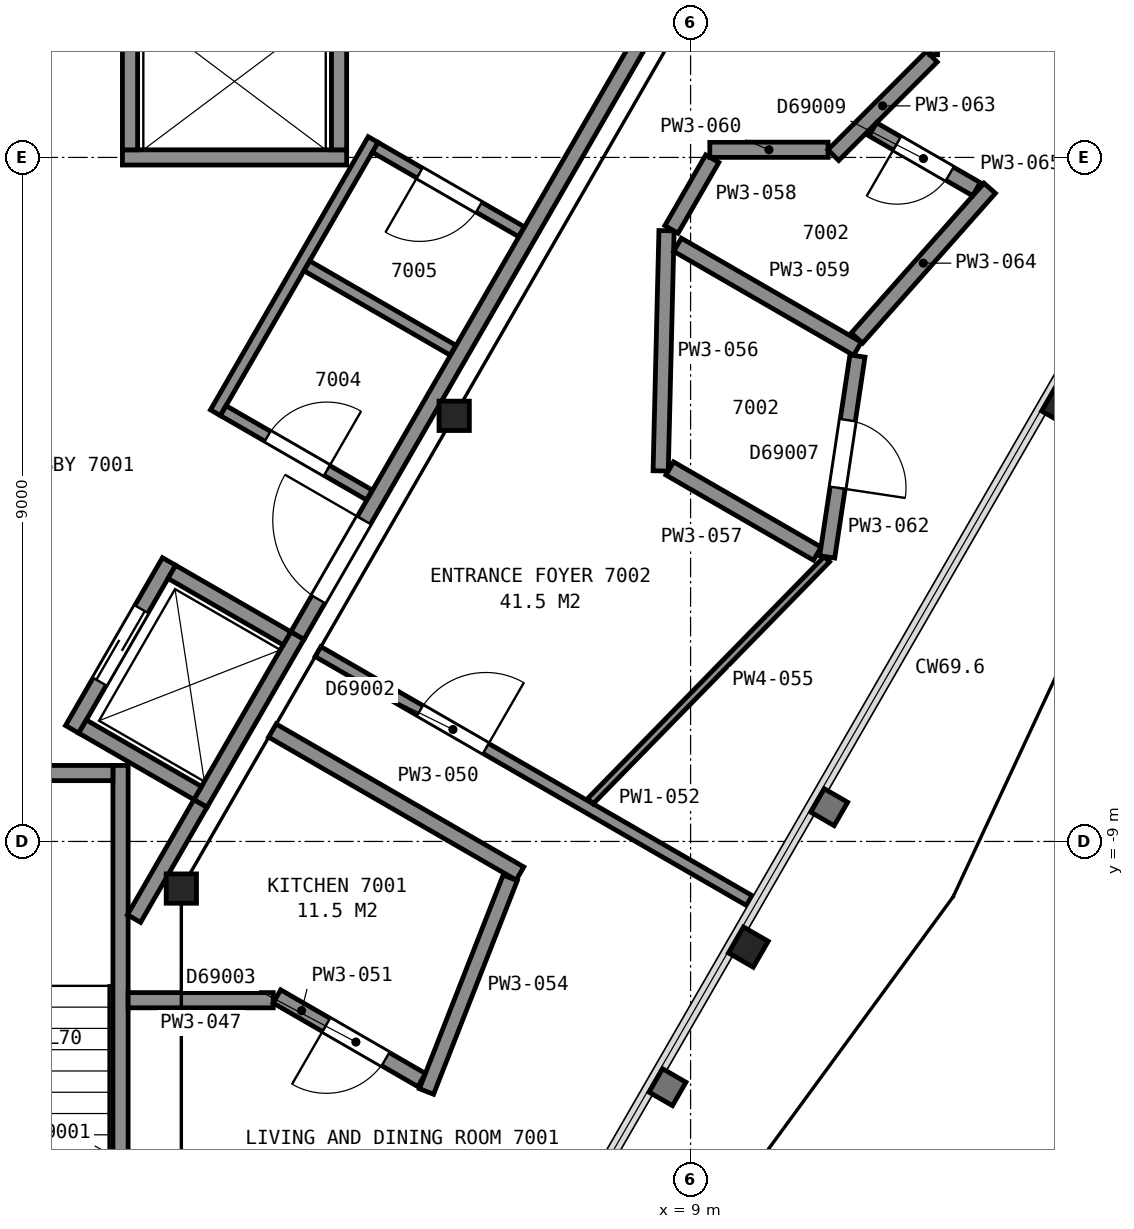
"""IFC4 building model, lengths in metres.
Left out: names, types, materials, properties, quantities, classifications, styles, units other than length and angle.
Written with IfcOpenShell. Run it as: python <this file> out.ifc"""

import sys

from ifc_helpers import new_model, si_unit, direction, frame, frame_2d, origin, origin_2d, place, context, subcontext, project, spatial, rectangle, i_section, extrude, element, fill, save


model = new_model("IFC4")
c1 = context("Model", 3, precision=1e-05, world=origin(), true_north=direction((0.0, 1.0)))
c2 = subcontext(c1, "Body", "Model", "MODEL_VIEW")
j1 = project(units=[si_unit("LENGTHUNIT", "METRE"), si_unit("PLANEANGLEUNIT", "RADIAN")], contexts=[c1])
p1 = place(None, origin())
s1 = spatial("IfcSite", under=j1, at=p1, CompositionType="ELEMENT")
p2 = place(p1, origin())
s2 = spatial("IfcBuilding", under=s1, at=p2, CompositionType="ELEMENT")
p3 = place(p2, frame((0.0, 0.0, 278.8)))
s3 = spatial("IfcBuildingStorey", under=s2, at=p3, CompositionType="ELEMENT", Elevation=278.8)
for number, where, z_axis, x_axis in (
    (1, (9.76, -10.39, 0.0), (0.0, 0.0, 1.0), (-0.5, -0.866, 0.0)),
    (2, (13.88, -3.26, 0.0), (0.0, 0.0, 1.0), (-0.5, -0.866, 0.0)),
):
    element("IfcColumn", number, at=place(p3, frame(where, z_axis=z_axis, x_axis=x_axis)), inside=s3, PredefinedType="COLUMN", context=c2, shape_type="SweptSolid", body=[
        extrude(i_section(OverallWidth=0.394, OverallDepth=0.376, WebThickness=0.017, FlangeThickness=0.028, FilletRadius=0.015, at=origin_2d()), origin(), (0.0, 0.0, 1.0), 3.7),
    ])
for number, where, z_axis, x_axis in (
    (3, (2.3, -9.62, 0.0), (0.0, 0.0, 1.0), (1.0, 0.0, 0.0)),
    (4, (5.89, -3.4, 0.0), (0.0, 0.0, 1.0), (1.0, 0.0, 0.0)),
):
    element("IfcColumn", number, at=place(p3, frame(where, z_axis=z_axis, x_axis=x_axis)), inside=s3, PredefinedType="COLUMN", context=c2, shape_type="SweptSolid", body=[
        extrude(i_section(OverallWidth=0.399, OverallDepth=0.386, WebThickness=0.021, FlangeThickness=0.033, FilletRadius=0.015, at=origin_2d()), origin(), (0.0, 0.0, 1.0), 3.7),
    ])
p4 = place(p3, frame((1.5, -8.0, 0.0), z_axis=(0.0, 0.0, 1.0), x_axis=(0.0, -1.0, 0.0)))
e5 = element("IfcWall", 5, at=p4, inside=s3, PredefinedType="PARTITIONING", context=c2, shape_type="SweptSolid", body=[
    extrude(rectangle(XDim=7.2, YDim=0.2, at=frame_2d((3.6, 0.0))), origin(), (0.0, 0.0, 1.0), 3.45),
])
p5 = place(p3, frame((-1.4, -8.1, 0.0), z_axis=(0.0, 0.0, 1.0), x_axis=(1.0, 0.0, 0.0)))
e6 = element("IfcWall", 6, at=p5, inside=s3, PredefinedType="PARTITIONING", context=c2, shape_type="SweptSolid", body=[
    extrude(rectangle(XDim=2.8, YDim=0.2, at=frame_2d((1.4, 0.0))), origin(), (0.0, 0.0, 1.0), 3.45),
])
p6 = place(p3, frame((1.525, 0.0, 0.0), z_axis=(0.0, 0.0, 1.0), x_axis=(1.0, 0.0, 0.0)))
e7 = element("IfcWall", 7, at=p6, inside=s3, PredefinedType="PARTITIONING", context=c2, shape_type="SweptSolid", body=[
    extrude(rectangle(XDim=2.95, YDim=0.2, at=frame_2d((1.475, 0.0))), origin(), (0.0, 0.0, 1.0), 3.7),
])
p7 = place(p3, frame((2.552, -8.5, 0.0), z_axis=(0.0, 0.0, 1.0), x_axis=(0.499990435942, 0.866030925526, 0.0)))
e8 = element("IfcWall", 8, at=p7, inside=s3, PredefinedType="PARTITIONING", context=c2, shape_type="SweptSolid", body=[
    extrude(rectangle(XDim=2.55, YDim=0.2, at=frame_2d((1.275, 0.0))), origin(), (0.0, 0.0, 1.0), 3.7),
])
p8 = place(p3, frame((0.863, -7.525, 0.0), z_axis=(0.0, 0.0, 1.0), x_axis=(0.499990435942, 0.866030925526, 0.0)))
e9 = element("IfcWall", 9, at=p8, inside=s3, PredefinedType="PARTITIONING", context=c2, shape_type="SweptSolid", body=[
    extrude(rectangle(XDim=2.55, YDim=0.2, at=frame_2d((1.275, 0.0))), origin(), (0.0, 0.0, 1.0), 3.7),
])
p9 = place(p8, frame((0.725, 0.0, 0.0)))
e10 = element("IfcOpeningElement", 10, at=p9, cuts=e9, PredefinedType="OPENING", context=c2, shape_type="SweptSolid", body=[
    extrude(rectangle(XDim=1.1, YDim=2.1, at=frame_2d((0.55, 1.05))), frame((0.0, 0.11, 0.0), z_axis=(0.0, -1.0, 0.0), x_axis=(1.0, 0.0, 0.0)), (0.0, 0.0, 1.0), 0.22),
])
for number, where, z_axis, x_axis in (
    (11, (4.375, 0.1, 0.0), (0.0, 0.0, 1.0), (0.0, 1.0, 0.0)),
    (12, (1.625, 0.1, 0.0), (0.0, 0.0, 1.0), (0.0, 1.0, 0.0)),
):
    element("IfcWall", number, at=place(p3, frame(where, z_axis=z_axis, x_axis=x_axis)), inside=s3, PredefinedType="PARTITIONING", context=c2, shape_type="SweptSolid", body=[
        extrude(rectangle(XDim=1.95, YDim=0.2, at=frame_2d((0.975, 0.0))), origin(), (0.0, 0.0, 1.0), 3.7),
    ])
for number, where, z_axis, x_axis in (
    (13, (3.69, -6.328, 0.0), (0.0, 0.0, 1.0), (-0.866, 0.5, 0.0)),
    (14, (2.515, -8.363, 0.0), (0.0, 0.0, 1.0), (-0.866, 0.5, 0.0)),
):
    element("IfcWall", number, at=place(p3, frame(where, z_axis=z_axis, x_axis=x_axis)), inside=s3, PredefinedType="PARTITIONING", context=c2, shape_type="SweptSolid", body=[
        extrude(rectangle(XDim=1.75, YDim=0.2, at=frame_2d((0.875, 0.0))), origin(), (0.0, 0.0, 1.0), 3.7),
    ])
p10 = place(p3, frame((1.677, -10.015, 0.0), z_axis=(0.0, 0.0, 1.0), x_axis=(0.49983532306, 0.866120459187, 0.0)))
e15 = element("IfcWall", 15, at=p10, inside=s3, PredefinedType="PARTITIONING", context=c2, shape_type="SweptSolid", body=[
    extrude(rectangle(XDim=1.748, YDim=0.2, at=frame_2d((0.874, 0.0))), origin(), (0.0, 0.0, 1.0), 3.45),
])
p11 = place(p3, frame((2.749, -3.359, 0.0), z_axis=(0.0, 0.0, 1.0), x_axis=(0.500017827812, 0.866015110648, 0.0)))
e16 = element("IfcWall", 16, at=p11, inside=s3, PredefinedType="PARTITIONING", context=c2, shape_type="SweptSolid", body=[
    extrude(rectangle(XDim=4.15, YDim=0.15, at=frame_2d((2.075, 0.0))), origin(), (0.0, 0.0, 1.0), 3.45),
])
p12 = place(p3, frame((2.851, -3.332, 0.0), z_axis=(0.0, 0.0, 1.0), x_axis=(0.866110524189, -0.499852538144, 0.0)))
e17 = element("IfcWall", 17, at=p12, inside=s3, PredefinedType="PARTITIONING", context=c2, shape_type="SweptSolid", body=[
    extrude(rectangle(XDim=2.22, YDim=0.15, at=frame_2d((1.11, 0.0))), origin(), (0.0, 0.0, 1.0), 3.45),
])
p13 = place(p12, frame((0.675, 0.0, 0.0)))
e18 = element("IfcOpeningElement", 18, at=p13, cuts=e17, PredefinedType="OPENING", context=c2, shape_type="SweptSolid", body=[
    extrude(rectangle(XDim=0.9, YDim=2.1, at=frame_2d((0.45, 1.05))), frame((0.0, 0.085, 0.0), z_axis=(0.0, -1.0, 0.0), x_axis=(1.0, 0.0, 0.0)), (0.0, 0.0, 1.0), 0.17),
])
p14 = place(p3, frame((3.828, -6.29, 0.0), z_axis=(0.0, 0.0, 1.0), x_axis=(0.499979739078, 0.866037101117, 0.0)))
e19 = element("IfcWall", 19, at=p14, inside=s3, PredefinedType="PARTITIONING", context=c2, shape_type="SweptSolid", body=[
    extrude(rectangle(XDim=11.363, YDim=0.2, at=frame_2d((5.681, 0.0))), origin(), (0.0, 0.0, 1.0), 3.45),
])
p15 = place(p14, frame((0.55, 0.0, 0.0)))
e20 = element("IfcOpeningElement", 20, at=p15, cuts=e19, PredefinedType="OPENING", context=c2, shape_type="SweptSolid", body=[
    extrude(rectangle(XDim=1.2, YDim=2.1, at=frame_2d((0.6, 1.05))), frame((0.0, 0.11, 0.0), z_axis=(0.0, -1.0, 0.0), x_axis=(1.0, 0.0, 0.0)), (0.0, 0.0, 1.0), 0.22),
])
p16 = place(p3, frame((3.951, -1.427, 0.0), z_axis=(0.0, 0.0, 1.0), x_axis=(0.866062920605, -0.499935013329, 0.0)))
e21 = element("IfcWall", 21, at=p16, inside=s3, PredefinedType="PARTITIONING", context=c2, shape_type="SweptSolid", body=[
    extrude(rectangle(XDim=2.22, YDim=0.15, at=frame_2d((1.11, 0.0))), origin(), (0.0, 0.0, 1.0), 3.45),
])
p17 = place(p3, frame((6.774, -0.978, 0.0), z_axis=(0.0, 0.0, 1.0), x_axis=(-0.866062920605, 0.499935013329, 0.0)))
e22 = element("IfcWall", 22, at=p17, inside=s3, PredefinedType="PARTITIONING", context=c2, shape_type="SweptSolid", body=[
    extrude(rectangle(XDim=2.22, YDim=0.15, at=frame_2d((1.11, 0.0))), origin(), (0.0, 0.0, 1.0), 3.45),
])
p18 = place(p17, frame((0.646, 0.0, 0.0)))
e23 = element("IfcOpeningElement", 23, at=p18, cuts=e22, PredefinedType="OPENING", context=c2, shape_type="SweptSolid", body=[
    extrude(rectangle(XDim=0.9, YDim=2.1, at=frame_2d((0.45, 1.05))), frame((0.0, 0.085, 0.0), z_axis=(0.0, -1.0, 0.0), x_axis=(1.0, 0.0, 0.0)), (0.0, 0.0, 1.0), 0.17),
])
p19 = place(p3, frame((1.6, -11.089, 0.0), z_axis=(0.0, 0.0, 1.0), x_axis=(1.0, 0.0, 0.0)))
e24 = element("IfcWall", 24, at=p19, inside=s3, PredefinedType="PARTITIONING", context=c2, shape_type="SweptSolid", body=[
    extrude(rectangle(XDim=1.909, YDim=0.2, at=frame_2d((0.955, 0.0))), origin(), (0.0, 0.0, 1.0), 2.723),
])
p20 = place(p3, frame((3.498, -7.541, 0.0), z_axis=(0.0, 0.0, 1.0), x_axis=(0.865985624761, -0.500068892961, 0.0)))
e25 = element("IfcWall", 25, at=p20, inside=s3, PredefinedType="PARTITIONING", context=c2, shape_type="SweptSolid", body=[
    extrude(rectangle(XDim=3.762, YDim=0.2, at=frame_2d((1.881, 0.0))), origin(), (0.0, 0.0, 1.0), 2.723),
])
p21 = place(p3, frame((3.557, -11.039, 0.0), z_axis=(0.0, 0.0, 1.0), x_axis=(0.865932364885, -0.500161113487, 0.0)))
e26 = element("IfcWall", 26, at=p21, inside=s3, PredefinedType="PARTITIONING", context=c2, shape_type="SweptSolid", body=[
    extrude(rectangle(XDim=2.2, YDim=0.2, at=frame_2d((1.1, 0.0))), origin(), (0.0, 0.0, 1.0), 2.723),
])
p22 = place(p21, frame((0.75, 0.0, 0.0)))
e27 = element("IfcOpeningElement", 27, at=p22, cuts=e26, PredefinedType="OPENING", context=c2, shape_type="SweptSolid", body=[
    extrude(rectangle(XDim=0.9, YDim=2.1, at=frame_2d((0.45, 1.05))), frame((0.0, 0.11, 0.0), z_axis=(0.0, -1.0, 0.0), x_axis=(1.0, 0.0, 0.0)), (0.0, 0.0, 1.0), 0.22),
])
p23 = place(p3, frame((9.772, -9.777, 0.0), z_axis=(0.0, 0.0, 1.0), x_axis=(-0.866083818164, 0.499898809675, 0.0)))
e28 = element("IfcWall", 28, at=p23, inside=s3, PredefinedType="PARTITIONING", context=c2, shape_type="SweptSolid", body=[
    extrude(rectangle(XDim=6.551, YDim=0.15, at=frame_2d((3.275, 0.0))), origin(), (0.0, 0.0, 1.0), 2.723),
])
p24 = place(p23, frame((4.001, 0.0, 0.0)))
e29 = element("IfcOpeningElement", 29, at=p24, cuts=e28, PredefinedType="OPENING", context=c2, shape_type="SweptSolid", body=[
    extrude(rectangle(XDim=1.0, YDim=2.1, at=frame_2d((0.5, 1.05))), frame((0.0, 0.085, 0.0), z_axis=(0.0, -1.0, 0.0), x_axis=(1.0, 0.0, 0.0)), (0.0, 0.0, 1.0), 0.17),
])
p25 = place(p3, frame((5.526, -12.29, 0.0), z_axis=(0.0, 0.0, 1.0), x_axis=(0.364786545928, 0.931091174864, 0.0)))
e30 = element("IfcWall", 30, at=p25, inside=s3, PredefinedType="PARTITIONING", context=c2, shape_type="SweptSolid", body=[
    extrude(rectangle(XDim=3.019, YDim=0.2, at=frame_2d((1.51, 0.0))), origin(), (0.0, 0.0, 1.0), 2.723),
])
p26 = place(p3, frame((7.682, -8.47, 0.0), z_axis=(0.0, 0.0, 1.0), x_axis=(0.698777378461, 0.715339203002, 0.0)))
e31 = element("IfcWall", 31, at=p26, inside=s3, PredefinedType="PARTITIONING", context=c2, shape_type="SweptSolid", body=[
    extrude(rectangle(XDim=4.452, YDim=0.1, at=frame_2d((2.226, 0.0))), origin(), (0.0, 0.0, 1.0), 2.723),
])
p27 = place(p3, frame((8.607, -4.125, 0.0), z_axis=(0.0, 0.0, 1.0), x_axis=(0.024245593124, 0.999706032399, 0.0)))
e32 = element("IfcWall", 32, at=p27, inside=s3, PredefinedType="PARTITIONING", context=c2, shape_type="SweptSolid", body=[
    extrude(rectangle(XDim=3.162, YDim=0.2, at=frame_2d((1.581, 0.0))), origin(), (0.0, 0.0, 1.0), 2.723),
])
p28 = place(p3, frame((8.726, -4.093, 0.0), z_axis=(0.0, 0.0, 1.0), x_axis=(0.866056839033, -0.499945548598, 0.0)))
e33 = element("IfcWall", 33, at=p28, inside=s3, PredefinedType="PARTITIONING", context=c2, shape_type="SweptSolid", body=[
    extrude(rectangle(XDim=2.242, YDim=0.2, at=frame_2d((1.121, 0.0))), origin(), (0.0, 0.0, 1.0), 2.723),
])
p29 = place(p3, frame((8.749, -0.947, 0.0), z_axis=(0.0, 0.0, 1.0), x_axis=(0.499656913366, 0.866223394354, 0.0)))
e34 = element("IfcWall", 34, at=p29, inside=s3, PredefinedType="PARTITIONING", context=c2, shape_type="SweptSolid", body=[
    extrude(rectangle(XDim=1.075, YDim=0.2, at=frame_2d((0.538, 0.0))), origin(), (0.0, 0.0, 1.0), 2.723),
])
p30 = place(p3, frame((8.828, -1.149, 0.0), z_axis=(0.0, 0.0, 1.0), x_axis=(0.865853899269, -0.50029693695, 0.0)))
e35 = element("IfcWall", 35, at=p30, inside=s3, PredefinedType="PARTITIONING", context=c2, shape_type="SweptSolid", body=[
    extrude(rectangle(XDim=2.734, YDim=0.2, at=frame_2d((1.367, 0.0))), origin(), (0.0, 0.0, 1.0), 2.723),
])
p31 = place(p3, frame((9.253, 0.101, 0.0), z_axis=(0.0, 0.0, 1.0), x_axis=(1.0, 0.0, 0.0)))
e36 = element("IfcWall", 36, at=p31, inside=s3, PredefinedType="PARTITIONING", context=c2, shape_type="SweptSolid", body=[
    extrude(rectangle(XDim=1.556, YDim=0.2, at=frame_2d((0.778, 0.0))), origin(), (0.0, 0.0, 1.0), 2.723),
])
p32 = place(p3, frame((10.797, -5.256, 0.0), z_axis=(0.0, 0.0, 1.0), x_axis=(0.148961207986, 0.988843040384, 0.0)))
e37 = element("IfcWall", 37, at=p32, inside=s3, PredefinedType="PARTITIONING", context=c2, shape_type="SweptSolid", body=[
    extrude(rectangle(XDim=2.673, YDim=0.2, at=frame_2d((1.336, 0.0))), origin(), (0.0, 0.0, 1.0), 2.723),
])
p33 = place(p32, frame((0.92, 0.0, 0.0)))
e38 = element("IfcOpeningElement", 38, at=p33, cuts=e37, PredefinedType="OPENING", context=c2, shape_type="SweptSolid", body=[
    extrude(rectangle(XDim=0.9, YDim=2.1, at=frame_2d((0.45, 1.05))), frame((0.0, 0.11, 0.0), z_axis=(0.0, -1.0, 0.0), x_axis=(1.0, 0.0, 0.0)), (0.0, 0.0, 1.0), 0.22),
])
p34 = place(p3, frame((10.878, 0.03, 0.0), z_axis=(0.0, 0.0, 1.0), x_axis=(0.707173379423, 0.707040176677, 0.0)))
e39 = element("IfcWall", 39, at=p34, inside=s3, PredefinedType="PARTITIONING", context=c2, shape_type="SweptSolid", body=[
    extrude(rectangle(XDim=1.833, YDim=0.2, at=frame_2d((0.917, 0.0))), origin(), (0.0, 0.0, 1.0), 2.723),
])
p35 = place(p3, frame((11.188, -2.377, 0.0), z_axis=(0.0, 0.0, 1.0), x_axis=(0.663045631266, 0.748578981043, 0.0)))
e40 = element("IfcWall", 40, at=p35, inside=s3, PredefinedType="PARTITIONING", context=c2, shape_type="SweptSolid", body=[
    extrude(rectangle(XDim=2.635, YDim=0.2, at=frame_2d((1.317, 0.0))), origin(), (0.0, 0.0, 1.0), 2.723),
])
p36 = place(p3, frame((12.761, -0.417, 0.0), z_axis=(0.0, 0.0, 1.0), x_axis=(-0.866030680601, 0.499990860175, 0.0)))
e41 = element("IfcWall", 41, at=p36, inside=s3, PredefinedType="PARTITIONING", context=c2, shape_type="SweptSolid", body=[
    extrude(rectangle(XDim=1.575, YDim=0.2, at=frame_2d((0.787, 0.0))), origin(), (0.0, 0.0, 1.0), 2.723),
])
p37 = place(p36, frame((0.405, 0.0, 0.0)))
e42 = element("IfcOpeningElement", 42, at=p37, cuts=e41, PredefinedType="OPENING", context=c2, shape_type="SweptSolid", body=[
    extrude(rectangle(XDim=0.8, YDim=2.1, at=frame_2d((0.4, 1.05))), frame((0.0, 0.11, 0.0), z_axis=(0.0, -1.0, 0.0), x_axis=(1.0, 0.0, 0.0)), (0.0, 0.0, 1.0), 0.22),
])
p38 = place(p3, frame((12.199, 3.682, 0.0), z_axis=(0.0, 0.0, 1.0), x_axis=(0.0, -1.0, 0.0)))
e43 = element("IfcWall", 43, at=p38, inside=s3, PredefinedType="PARTITIONING", context=c2, shape_type="SweptSolid", body=[
    extrude(rectangle(XDim=2.331, YDim=0.1, at=frame_2d((1.166, 0.0))), origin(), (0.0, 0.0, 1.0), 2.723),
])
p39 = place(p38, frame((0.631, 0.0, 0.0)))
e44 = element("IfcOpeningElement", 44, at=p39, cuts=e43, PredefinedType="OPENING", context=c2, shape_type="SweptSolid", body=[
    extrude(rectangle(XDim=1.0, YDim=2.1, at=frame_2d((0.5, 1.05))), frame((0.0, 0.06, 0.0), z_axis=(0.0, -1.0, 0.0), x_axis=(1.0, 0.0, 0.0)), (0.0, 0.0, 1.0), 0.12),
])
p40 = place(p9, origin())
e45 = element("IfcDoor", 45, at=p40, inside=s3, OperationType="SLIDING_TO_LEFT", PredefinedType="DOOR", context=c2, shape_type="SweptSolid", body=[
    extrude(rectangle(XDim=1.1, YDim=2.1, at=frame_2d((0.55, 1.05))), frame((0.0, 0.025, 0.0), z_axis=(0.0, -1.0, 0.0), x_axis=(1.0, 0.0, 0.0)), (0.0, 0.0, 1.0), 0.05),
])
fill(e10, e45)
p41 = place(p13, origin())
e46 = element("IfcDoor", 46, at=p41, inside=s3, OperationType="SINGLE_SWING_RIGHT", PredefinedType="DOOR", context=c2, shape_type="SweptSolid", body=[
    extrude(rectangle(XDim=0.9, YDim=2.1, at=frame_2d((0.45, 1.05))), frame((0.0, 0.025, 0.0), z_axis=(0.0, -1.0, 0.0), x_axis=(1.0, 0.0, 0.0)), (0.0, 0.0, 1.0), 0.05),
])
fill(e18, e46)
p42 = place(p15, origin())
e47 = element("IfcDoor", 47, at=p42, inside=s3, OperationType="SINGLE_SWING_RIGHT", PredefinedType="DOOR", context=c2, shape_type="SweptSolid", body=[
    extrude(rectangle(XDim=1.2, YDim=2.1, at=frame_2d((0.6, 1.05))), frame((0.0, 0.025, 0.0), z_axis=(0.0, -1.0, 0.0), x_axis=(1.0, 0.0, 0.0)), (0.0, 0.0, 1.0), 0.05),
])
fill(e20, e47)
p43 = place(p18, origin())
e48 = element("IfcDoor", 48, at=p43, inside=s3, OperationType="SINGLE_SWING_RIGHT", PredefinedType="DOOR", context=c2, shape_type="SweptSolid", body=[
    extrude(rectangle(XDim=0.9, YDim=2.1, at=frame_2d((0.45, 1.05))), frame((0.0, 0.025, 0.0), z_axis=(0.0, -1.0, 0.0), x_axis=(1.0, 0.0, 0.0)), (0.0, 0.0, 1.0), 0.05),
])
fill(e23, e48)
p44 = place(p22, origin())
e49 = element("IfcDoor", 49, at=p44, inside=s3, OperationType="SINGLE_SWING_LEFT", PredefinedType="DOOR", context=c2, shape_type="SweptSolid", body=[
    extrude(rectangle(XDim=0.9, YDim=2.1, at=frame_2d((0.45, 1.05))), frame((0.0, 0.025, 0.0), z_axis=(0.0, -1.0, 0.0), x_axis=(1.0, 0.0, 0.0)), (0.0, 0.0, 1.0), 0.05),
])
fill(e27, e49)
p45 = place(p24, origin())
e50 = element("IfcDoor", 50, at=p45, inside=s3, OperationType="SINGLE_SWING_LEFT", PredefinedType="DOOR", context=c2, shape_type="SweptSolid", body=[
    extrude(rectangle(XDim=1.0, YDim=2.1, at=frame_2d((0.5, 1.05))), frame((0.0, 0.025, 0.0), z_axis=(0.0, -1.0, 0.0), x_axis=(1.0, 0.0, 0.0)), (0.0, 0.0, 1.0), 0.05),
])
fill(e29, e50)
p46 = place(p33, origin())
e51 = element("IfcDoor", 51, at=p46, inside=s3, OperationType="SINGLE_SWING_LEFT", PredefinedType="DOOR", context=c2, shape_type="SweptSolid", body=[
    extrude(rectangle(XDim=0.9, YDim=2.1, at=frame_2d((0.45, 1.05))), frame((0.0, 0.025, 0.0), z_axis=(0.0, -1.0, 0.0), x_axis=(1.0, 0.0, 0.0)), (0.0, 0.0, 1.0), 0.05),
])
fill(e38, e51)
p47 = place(p37, origin())
e52 = element("IfcDoor", 52, at=p47, inside=s3, OperationType="SINGLE_SWING_RIGHT", PredefinedType="DOOR", context=c2, shape_type="SweptSolid", body=[
    extrude(rectangle(XDim=0.8, YDim=2.1, at=frame_2d((0.4, 1.05))), frame((0.0, 0.025, 0.0), z_axis=(0.0, -1.0, 0.0), x_axis=(1.0, 0.0, 0.0)), (0.0, 0.0, 1.0), 0.05),
])
fill(e42, e52)
save(model, sys.argv[1])
